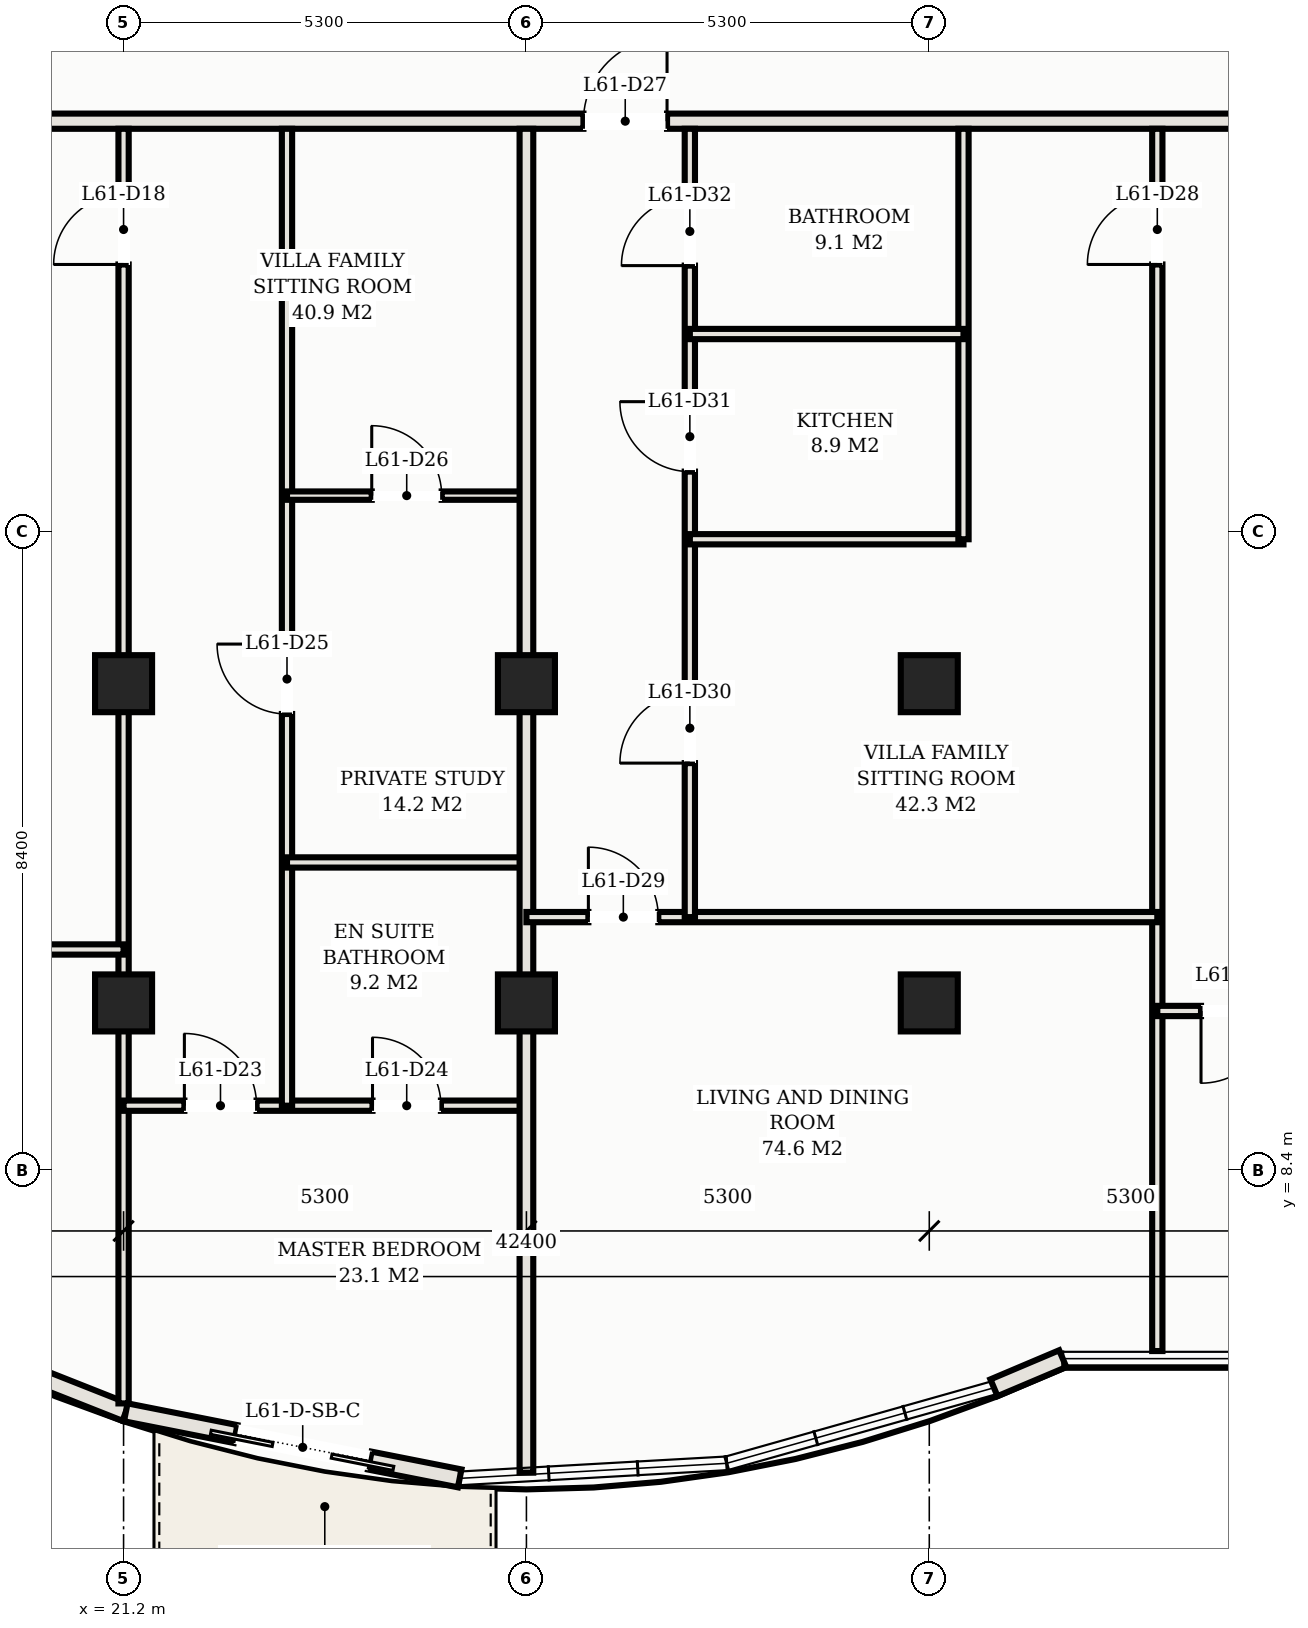
"""IFC4 building model, lengths in metres.
Left out: names, types, materials, properties, quantities, classifications, styles, units other than length and angle.
Written with IfcOpenShell. Run it as: python <this file> out.ifc"""

import sys

from ifc_helpers import new_model, si_unit, direction, frame, frame_2d, origin, origin_2d, place, context, subcontext, project, spatial, rectangle, hollow_rectangle, extrude, element, fill, save


model = new_model("IFC4")
c1 = context("Model", 3, precision=1e-05, world=origin(), true_north=direction((0.0, 1.0)))
c2 = subcontext(c1, "Body", "Model", "MODEL_VIEW")
j1 = project(units=[si_unit("LENGTHUNIT", "METRE"), si_unit("PLANEANGLEUNIT", "RADIAN")], contexts=[c1])
p1 = place(None, origin())
s1 = spatial("IfcSite", under=j1, at=p1, CompositionType="ELEMENT")
p2 = place(p1, origin())
s2 = spatial("IfcBuilding", under=s1, at=p2, CompositionType="ELEMENT")
p3 = place(p2, frame((0.0, 0.0, 223.1)))
s3 = spatial("IfcBuildingStorey", under=s2, at=p3, CompositionType="ELEMENT", Elevation=223.1)
for number, where, z_axis, x_axis in (
    (1, (21.2, 14.8, 0.0), (0.0, 0.0, 1.0), (1.0, 0.0, 0.0)),
    (2, (21.2, 10.6, 0.0), (0.0, 0.0, 1.0), (1.0, 0.0, 0.0)),
    (3, (26.5, 14.8, 0.0), (0.0, 0.0, 1.0), (1.0, 0.0, 0.0)),
    (4, (26.5, 10.6, 0.0), (0.0, 0.0, 1.0), (1.0, 0.0, 0.0)),
    (5, (31.8, 14.8, 0.0), (0.0, 0.0, 1.0), (1.0, 0.0, 0.0)),
    (6, (31.8, 10.6, 0.0), (0.0, 0.0, 1.0), (1.0, 0.0, 0.0)),
):
    element("IfcColumn", number, at=place(p3, frame(where, z_axis=z_axis, x_axis=x_axis)), inside=s3, PredefinedType="COLUMN", context=c2, shape_type="SweptSolid", body=[
        extrude(hollow_rectangle(XDim=0.75, YDim=0.75, WallThickness=0.025, at=origin_2d()), origin(), (0.0, 0.0, 1.0), 3.3),
    ])
p4 = place(p3, frame((19.444, 5.92, 0.0), z_axis=(0.0, 0.0, 1.0), x_axis=(0.92993442177, -0.367725401906, 0.0)))
e7 = element("IfcWall", 7, at=p4, inside=s3, PredefinedType="SOLIDWALL", context=c2, shape_type="SweptSolid", body=[
    extrude(rectangle(XDim=1.919, YDim=0.24, at=frame_2d((0.96, 0.0))), origin(), (0.0, 0.0, 1.0), 3.11),
])
p5 = place(p3, frame((21.229, 5.214, 0.0), z_axis=(0.0, 0.0, 1.0), x_axis=(0.980985349685, -0.194081796425, 0.0)))
e8 = element("IfcWall", 8, at=p5, inside=s3, PredefinedType="SOLIDWALL", context=c2, shape_type="SweptSolid", body=[
    extrude(rectangle(XDim=4.478, YDim=0.24, at=frame_2d((2.239, 0.0))), origin(), (0.0, 0.0, 1.0), 3.11),
])
p6 = place(p5, frame((1.473, 0.0, 0.0)))
e9 = element("IfcOpeningElement", 9, at=p6, cuts=e8, PredefinedType="OPENING", context=c2, shape_type="SweptSolid", body=[
    extrude(rectangle(XDim=1.8, YDim=2.2, at=frame_2d((0.9, 1.1))), frame((0.0, 0.13, 0.0), z_axis=(0.0, -1.0, 0.0), x_axis=(1.0, 0.0, 0.0)), (0.0, 0.0, 1.0), 0.26),
])
p7 = place(p3, frame((32.651, 5.537, 0.0), z_axis=(0.0, 0.0, 1.0), x_axis=(0.920998109395, 0.389567044924, 0.0)))
e10 = element("IfcWall", 10, at=p7, inside=s3, PredefinedType="SOLIDWALL", context=c2, shape_type="SweptSolid", body=[
    extrude(rectangle(XDim=0.983, YDim=0.24, at=frame_2d((0.491, 0.0))), origin(), (0.0, 0.0, 1.0), 3.11),
])
p8 = place(p3, frame((6.72, 22.2, 0.0), z_axis=(0.0, 0.0, 1.0), x_axis=(1.0, 0.0, 0.0)))
e11 = element("IfcWall", 11, at=p8, inside=s3, PredefinedType="PARTITIONING", context=c2, shape_type="SweptSolid", body=[
    extrude(rectangle(XDim=39.56, YDim=0.2, at=frame_2d((19.78, 0.0))), origin(), (0.0, 0.0, 1.0), 2.43),
])
p9 = place(p8, frame((4.63, 0.0, 0.0)))
e12 = element("IfcOpeningElement", 12, at=p9, cuts=e11, PredefinedType="OPENING", context=c2, shape_type="SweptSolid", body=[
    extrude(rectangle(XDim=1.1, YDim=2.25, at=frame_2d((0.55, 1.125))), frame((0.0, 0.11, 0.0), z_axis=(0.0, -1.0, 0.0), x_axis=(1.0, 0.0, 0.0)), (0.0, 0.0, 1.0), 0.22),
])
p10 = place(p8, frame((20.53, 0.0, 0.0)))
e13 = element("IfcOpeningElement", 13, at=p10, cuts=e11, PredefinedType="OPENING", context=c2, shape_type="SweptSolid", body=[
    extrude(rectangle(XDim=1.1, YDim=2.25, at=frame_2d((0.55, 1.125))), frame((0.0, 0.11, 0.0), z_axis=(0.0, -1.0, 0.0), x_axis=(1.0, 0.0, 0.0)), (0.0, 0.0, 1.0), 0.22),
])
p11 = place(p8, frame((1.435, 0.0, 0.0)))
e14 = element("IfcOpeningElement", 14, at=p11, cuts=e11, PredefinedType="OPENING", context=c2, shape_type="SweptSolid", body=[
    extrude(rectangle(XDim=0.92, YDim=2.15, at=frame_2d((0.46, 1.075))), frame((0.0, 0.11, 0.0), z_axis=(0.0, -1.0, 0.0), x_axis=(1.0, 0.0, 0.0)), (0.0, 0.0, 1.0), 0.22),
])
p12 = place(p8, frame((37.205, 0.0, 0.0)))
e15 = element("IfcOpeningElement", 15, at=p12, cuts=e11, PredefinedType="OPENING", context=c2, shape_type="SweptSolid", body=[
    extrude(rectangle(XDim=0.92, YDim=2.15, at=frame_2d((0.46, 1.075))), frame((0.0, 0.11, 0.0), z_axis=(0.0, -1.0, 0.0), x_axis=(1.0, 0.0, 0.0)), (0.0, 0.0, 1.0), 0.22),
])
p13 = place(p3, frame((21.2, 5.331, 0.0), z_axis=(0.0, 0.0, 1.0), x_axis=(0.0, 1.0, 0.0)))
e16 = element("IfcWall", 16, at=p13, inside=s3, PredefinedType="PARTITIONING", context=c2, shape_type="SweptSolid", body=[
    extrude(rectangle(XDim=16.769, YDim=0.135, at=frame_2d((8.385, 0.0))), origin(), (0.0, 0.0, 1.0), 2.43),
])
p14 = place(p13, frame((14.984, 0.0, 0.0)))
e17 = element("IfcOpeningElement", 17, at=p14, cuts=e16, PredefinedType="OPENING", context=c2, shape_type="SweptSolid", body=[
    extrude(rectangle(XDim=0.92, YDim=2.15, at=frame_2d((0.46, 1.075))), frame((0.0, 0.078, 0.0), z_axis=(0.0, -1.0, 0.0), x_axis=(1.0, 0.0, 0.0)), (0.0, 0.0, 1.0), 0.155),
])
p15 = place(p3, frame((10.6, 11.303, 0.0), z_axis=(0.0, 0.0, 1.0), x_axis=(1.0, 0.0, 0.0)))
e18 = element("IfcWall", 18, at=p15, inside=s3, PredefinedType="PARTITIONING", context=c2, shape_type="SweptSolid", body=[
    extrude(rectangle(XDim=10.6, YDim=0.135, at=frame_2d((5.3, 0.0))), origin(), (0.0, 0.0, 1.0), 2.43),
])
p16 = place(p15, frame((0.815, 0.0, 0.0)))
e19 = element("IfcOpeningElement", 19, at=p16, cuts=e18, PredefinedType="OPENING", context=c2, shape_type="SweptSolid", body=[
    extrude(rectangle(XDim=0.92, YDim=2.15, at=frame_2d((0.46, 1.075))), frame((0.0, 0.078, 0.0), z_axis=(0.0, -1.0, 0.0), x_axis=(1.0, 0.0, 0.0)), (0.0, 0.0, 1.0), 0.155),
])
p17 = place(p3, frame((21.2, 9.248, 0.0), z_axis=(0.0, 0.0, 1.0), x_axis=(1.0, 0.0, 0.0)))
e20 = element("IfcWall", 20, at=p17, inside=s3, PredefinedType="PARTITIONING", context=c2, shape_type="SweptSolid", body=[
    extrude(rectangle(XDim=5.3, YDim=0.135, at=frame_2d((2.65, 0.0))), origin(), (0.0, 0.0, 1.0), 2.43),
])
p18 = place(p17, frame((0.8, 0.0, 0.0)))
e21 = element("IfcOpeningElement", 21, at=p18, cuts=e20, PredefinedType="OPENING", context=c2, shape_type="SweptSolid", body=[
    extrude(rectangle(XDim=0.95, YDim=2.15, at=frame_2d((0.475, 1.075))), frame((0.0, 0.078, 0.0), z_axis=(0.0, -1.0, 0.0), x_axis=(1.0, 0.0, 0.0)), (0.0, 0.0, 1.0), 0.155),
])
p19 = place(p17, frame((3.275, 0.0, 0.0)))
e22 = element("IfcOpeningElement", 22, at=p19, cuts=e20, PredefinedType="OPENING", context=c2, shape_type="SweptSolid", body=[
    extrude(rectangle(XDim=0.9, YDim=2.15, at=frame_2d((0.45, 1.075))), frame((0.0, 0.078, 0.0), z_axis=(0.0, -1.0, 0.0), x_axis=(1.0, 0.0, 0.0)), (0.0, 0.0, 1.0), 0.155),
])
p20 = place(p3, frame((23.35, 9.248, 0.0), z_axis=(0.0, 0.0, 1.0), x_axis=(0.0, 1.0, 0.0)))
e23 = element("IfcWall", 23, at=p20, inside=s3, PredefinedType="PARTITIONING", context=c2, shape_type="SweptSolid", body=[
    extrude(rectangle(XDim=12.852, YDim=0.135, at=frame_2d((6.426, 0.0))), origin(), (0.0, 0.0, 1.0), 2.43),
])
p21 = place(p20, frame((5.153, 0.0, 0.0)))
e24 = element("IfcOpeningElement", 24, at=p21, cuts=e23, PredefinedType="OPENING", context=c2, shape_type="SweptSolid", body=[
    extrude(rectangle(XDim=0.92, YDim=2.15, at=frame_2d((0.46, 1.075))), frame((0.0, 0.078, 0.0), z_axis=(0.0, -1.0, 0.0), x_axis=(1.0, 0.0, 0.0)), (0.0, 0.0, 1.0), 0.155),
])
p22 = place(p3, frame((23.35, 12.448, 0.0), z_axis=(0.0, 0.0, 1.0), x_axis=(1.0, 0.0, 0.0)))
e25 = element("IfcWall", 25, at=p22, inside=s3, PredefinedType="PARTITIONING", context=c2, shape_type="SweptSolid", body=[
    extrude(rectangle(XDim=3.15, YDim=0.135, at=frame_2d((1.575, 0.0))), origin(), (0.0, 0.0, 1.0), 2.43),
])
p23 = place(p3, frame((23.35, 17.274, 0.0), z_axis=(0.0, 0.0, 1.0), x_axis=(1.0, 0.0, 0.0)))
e26 = element("IfcWall", 26, at=p23, inside=s3, PredefinedType="MOVABLE", context=c2, shape_type="SweptSolid", body=[
    extrude(rectangle(XDim=3.15, YDim=0.11, at=frame_2d((1.575, 0.0))), origin(), (0.0, 0.0, 1.0), 2.43),
])
p24 = place(p23, frame((1.115, 0.0, 0.0)))
e27 = element("IfcOpeningElement", 27, at=p24, cuts=e26, PredefinedType="OPENING", context=c2, shape_type="SweptSolid", body=[
    extrude(rectangle(XDim=0.92, YDim=2.15, at=frame_2d((0.46, 1.075))), frame((0.0, 0.065, 0.0), z_axis=(0.0, -1.0, 0.0), x_axis=(1.0, 0.0, 0.0)), (0.0, 0.0, 1.0), 0.13),
])
p25 = place(p3, frame((26.5, 4.42, 0.0), z_axis=(0.0, 0.0, 1.0), x_axis=(0.0, 1.0, 0.0)))
e28 = element("IfcWall", 28, at=p25, inside=s3, PredefinedType="PARTITIONING", context=c2, shape_type="SweptSolid", body=[
    extrude(rectangle(XDim=17.68, YDim=0.18, at=frame_2d((8.84, 0.0))), origin(), (0.0, 0.0, 1.0), 2.43),
])
p26 = place(p3, frame((34.8, 6.02, 0.0), z_axis=(0.0, 0.0, 1.0), x_axis=(0.0, 1.0, 0.0)))
e29 = element("IfcWall", 29, at=p26, inside=s3, PredefinedType="PARTITIONING", context=c2, shape_type="SweptSolid", body=[
    extrude(rectangle(XDim=16.08, YDim=0.135, at=frame_2d((8.04, 0.0))), origin(), (0.0, 0.0, 1.0), 2.43),
])
p27 = place(p26, frame((14.295, 0.0, 0.0)))
e30 = element("IfcOpeningElement", 30, at=p27, cuts=e29, PredefinedType="OPENING", context=c2, shape_type="SweptSolid", body=[
    extrude(rectangle(XDim=0.92, YDim=2.15, at=frame_2d((0.46, 1.075))), frame((0.0, 0.078, 0.0), z_axis=(0.0, -1.0, 0.0), x_axis=(1.0, 0.0, 0.0)), (0.0, 0.0, 1.0), 0.155),
])
p28 = place(p3, frame((26.5, 11.729, 0.0), z_axis=(0.0, 0.0, 1.0), x_axis=(1.0, 0.0, 0.0)))
e31 = element("IfcWall", 31, at=p28, inside=s3, PredefinedType="PARTITIONING", context=c2, shape_type="SweptSolid", body=[
    extrude(rectangle(XDim=8.3, YDim=0.135, at=frame_2d((4.15, 0.0))), origin(), (0.0, 0.0, 1.0), 2.43),
])
p29 = place(p28, frame((0.815, 0.0, 0.0)))
e32 = element("IfcOpeningElement", 32, at=p29, cuts=e31, PredefinedType="OPENING", context=c2, shape_type="SweptSolid", body=[
    extrude(rectangle(XDim=0.92, YDim=2.15, at=frame_2d((0.46, 1.075))), frame((0.0, 0.078, 0.0), z_axis=(0.0, -1.0, 0.0), x_axis=(1.0, 0.0, 0.0)), (0.0, 0.0, 1.0), 0.155),
])
p30 = place(p3, frame((28.65, 11.729, 0.0), z_axis=(0.0, 0.0, 1.0), x_axis=(0.0, 1.0, 0.0)))
e33 = element("IfcWall", 33, at=p30, inside=s3, PredefinedType="PARTITIONING", context=c2, shape_type="SweptSolid", body=[
    extrude(rectangle(XDim=10.371, YDim=0.135, at=frame_2d((5.186, 0.0))), origin(), (0.0, 0.0, 1.0), 2.43),
])
p31 = place(p30, frame((2.026, 0.0, 0.0)))
e34 = element("IfcOpeningElement", 34, at=p31, cuts=e33, PredefinedType="OPENING", context=c2, shape_type="SweptSolid", body=[
    extrude(rectangle(XDim=0.92, YDim=2.15, at=frame_2d((0.46, 1.075))), frame((0.0, 0.078, 0.0), z_axis=(0.0, -1.0, 0.0), x_axis=(1.0, 0.0, 0.0)), (0.0, 0.0, 1.0), 0.155),
])
p32 = place(p30, frame((5.861, 0.0, 0.0)))
e35 = element("IfcOpeningElement", 35, at=p32, cuts=e33, PredefinedType="OPENING", context=c2, shape_type="SweptSolid", body=[
    extrude(rectangle(XDim=0.92, YDim=2.15, at=frame_2d((0.46, 1.075))), frame((0.0, 0.078, 0.0), z_axis=(0.0, -1.0, 0.0), x_axis=(1.0, 0.0, 0.0)), (0.0, 0.0, 1.0), 0.155),
])
p33 = place(p30, frame((8.571, 0.0, 0.0)))
e36 = element("IfcOpeningElement", 36, at=p33, cuts=e33, PredefinedType="OPENING", context=c2, shape_type="SweptSolid", body=[
    extrude(rectangle(XDim=0.9, YDim=2.15, at=frame_2d((0.45, 1.075))), frame((0.0, 0.078, 0.0), z_axis=(0.0, -1.0, 0.0), x_axis=(1.0, 0.0, 0.0)), (0.0, 0.0, 1.0), 0.155),
])
p34 = place(p3, frame((28.65, 16.7, 0.0), z_axis=(0.0, 0.0, 1.0), x_axis=(1.0, 0.0, 0.0)))
e37 = element("IfcWall", 37, at=p34, inside=s3, PredefinedType="PARTITIONING", context=c2, shape_type="SweptSolid", body=[
    extrude(rectangle(XDim=3.6, YDim=0.135, at=frame_2d((1.8, 0.0))), origin(), (0.0, 0.0, 1.0), 2.43),
])
p35 = place(p3, frame((32.25, 16.7, 0.0), z_axis=(0.0, 0.0, 1.0), x_axis=(0.0, 1.0, 0.0)))
e38 = element("IfcWall", 38, at=p35, inside=s3, PredefinedType="PARTITIONING", context=c2, shape_type="SweptSolid", body=[
    extrude(rectangle(XDim=5.4, YDim=0.135, at=frame_2d((2.7, 0.0))), origin(), (0.0, 0.0, 1.0), 2.43),
])
p36 = place(p3, frame((28.65, 19.4, 0.0), z_axis=(0.0, 0.0, 1.0), x_axis=(1.0, 0.0, 0.0)))
e39 = element("IfcWall", 39, at=p36, inside=s3, PredefinedType="PARTITIONING", context=c2, shape_type="SweptSolid", body=[
    extrude(rectangle(XDim=3.6, YDim=0.135, at=frame_2d((1.8, 0.0))), origin(), (0.0, 0.0, 1.0), 2.43),
])
p37 = place(p3, frame((34.8, 10.494, 0.0), z_axis=(0.0, 0.0, 1.0), x_axis=(1.0, 0.0, 0.0)))
e40 = element("IfcWall", 40, at=p37, inside=s3, PredefinedType="PARTITIONING", context=c2, shape_type="SweptSolid", body=[
    extrude(rectangle(XDim=7.6, YDim=0.135, at=frame_2d((3.8, 0.0))), origin(), (0.0, 0.0, 1.0), 2.43),
])
p38 = place(p37, frame((0.575, 0.0, 0.0)))
e41 = element("IfcOpeningElement", 41, at=p38, cuts=e40, PredefinedType="OPENING", context=c2, shape_type="SweptSolid", body=[
    extrude(rectangle(XDim=0.95, YDim=2.15, at=frame_2d((0.475, 1.075))), frame((0.0, 0.078, 0.0), z_axis=(0.0, -1.0, 0.0), x_axis=(1.0, 0.0, 0.0)), (0.0, 0.0, 1.0), 0.155),
])
p39 = place(p37, frame((4.95, 0.0, 0.0)))
e42 = element("IfcOpeningElement", 42, at=p39, cuts=e40, PredefinedType="OPENING", context=c2, shape_type="SweptSolid", body=[
    extrude(rectangle(XDim=0.9, YDim=2.15, at=frame_2d((0.45, 1.075))), frame((0.0, 0.078, 0.0), z_axis=(0.0, -1.0, 0.0), x_axis=(1.0, 0.0, 0.0)), (0.0, 0.0, 1.0), 0.155),
])
p40 = place(p6, frame((1.8, 0.0, 0.0), z_axis=(0.0, 0.0, 1.0), x_axis=(-1.0, 0.0, 0.0)))
e43 = element("IfcDoor", 43, at=p40, inside=s3, OperationType="DOUBLE_DOOR_SLIDING", PredefinedType="DOOR", context=c2, shape_type="SweptSolid", body=[
    extrude(rectangle(XDim=1.8, YDim=2.2, at=frame_2d((0.9, 1.1))), frame((0.0, 0.025, 0.0), z_axis=(0.0, -1.0, 0.0), x_axis=(1.0, 0.0, 0.0)), (0.0, 0.0, 1.0), 0.05),
])
fill(e9, e43)
p41 = place(p14, origin())
e44 = element("IfcDoor", 44, at=p41, inside=s3, OperationType="SINGLE_SWING_LEFT", PredefinedType="DOOR", context=c2, shape_type="SweptSolid", body=[
    extrude(rectangle(XDim=0.92, YDim=2.15, at=frame_2d((0.46, 1.075))), frame((0.0, 0.025, 0.0), z_axis=(0.0, -1.0, 0.0), x_axis=(1.0, 0.0, 0.0)), (0.0, 0.0, 1.0), 0.05),
])
fill(e17, e44)
p42 = place(p18, origin())
e45 = element("IfcDoor", 45, at=p42, inside=s3, OperationType="SINGLE_SWING_LEFT", PredefinedType="DOOR", context=c2, shape_type="SweptSolid", body=[
    extrude(rectangle(XDim=0.95, YDim=2.15, at=frame_2d((0.475, 1.075))), frame((0.0, 0.025, 0.0), z_axis=(0.0, -1.0, 0.0), x_axis=(1.0, 0.0, 0.0)), (0.0, 0.0, 1.0), 0.05),
])
fill(e21, e45)
p43 = place(p19, origin())
e46 = element("IfcDoor", 46, at=p43, inside=s3, OperationType="SINGLE_SWING_LEFT", PredefinedType="DOOR", context=c2, shape_type="SweptSolid", body=[
    extrude(rectangle(XDim=0.9, YDim=2.15, at=frame_2d((0.45, 1.075))), frame((0.0, 0.025, 0.0), z_axis=(0.0, -1.0, 0.0), x_axis=(1.0, 0.0, 0.0)), (0.0, 0.0, 1.0), 0.05),
])
fill(e22, e46)
p44 = place(p21, origin())
e47 = element("IfcDoor", 47, at=p44, inside=s3, OperationType="SINGLE_SWING_RIGHT", PredefinedType="DOOR", context=c2, shape_type="SweptSolid", body=[
    extrude(rectangle(XDim=0.92, YDim=2.15, at=frame_2d((0.46, 1.075))), frame((0.0, 0.025, 0.0), z_axis=(0.0, -1.0, 0.0), x_axis=(1.0, 0.0, 0.0)), (0.0, 0.0, 1.0), 0.05),
])
fill(e24, e47)
p45 = place(p24, origin())
e48 = element("IfcDoor", 48, at=p45, inside=s3, OperationType="SINGLE_SWING_LEFT", PredefinedType="DOOR", context=c2, shape_type="SweptSolid", body=[
    extrude(rectangle(XDim=0.92, YDim=2.15, at=frame_2d((0.46, 1.075))), frame((0.0, 0.025, 0.0), z_axis=(0.0, -1.0, 0.0), x_axis=(1.0, 0.0, 0.0)), (0.0, 0.0, 1.0), 0.05),
])
fill(e27, e48)
p46 = place(p10, origin())
e49 = element("IfcDoor", 49, at=p46, inside=s3, OperationType="SINGLE_SWING_RIGHT", PredefinedType="DOOR", context=c2, shape_type="SweptSolid", body=[
    extrude(rectangle(XDim=1.1, YDim=2.25, at=frame_2d((0.55, 1.125))), frame((0.0, 0.025, 0.0), z_axis=(0.0, -1.0, 0.0), x_axis=(1.0, 0.0, 0.0)), (0.0, 0.0, 1.0), 0.05),
])
fill(e13, e49)
p47 = place(p27, origin())
e50 = element("IfcDoor", 50, at=p47, inside=s3, OperationType="SINGLE_SWING_LEFT", PredefinedType="DOOR", context=c2, shape_type="SweptSolid", body=[
    extrude(rectangle(XDim=0.92, YDim=2.15, at=frame_2d((0.46, 1.075))), frame((0.0, 0.025, 0.0), z_axis=(0.0, -1.0, 0.0), x_axis=(1.0, 0.0, 0.0)), (0.0, 0.0, 1.0), 0.05),
])
fill(e30, e50)
p48 = place(p29, origin())
e51 = element("IfcDoor", 51, at=p48, inside=s3, OperationType="SINGLE_SWING_LEFT", PredefinedType="DOOR", context=c2, shape_type="SweptSolid", body=[
    extrude(rectangle(XDim=0.92, YDim=2.15, at=frame_2d((0.46, 1.075))), frame((0.0, 0.025, 0.0), z_axis=(0.0, -1.0, 0.0), x_axis=(1.0, 0.0, 0.0)), (0.0, 0.0, 1.0), 0.05),
])
fill(e32, e51)
p49 = place(p31, origin())
e52 = element("IfcDoor", 52, at=p49, inside=s3, OperationType="SINGLE_SWING_LEFT", PredefinedType="DOOR", context=c2, shape_type="SweptSolid", body=[
    extrude(rectangle(XDim=0.92, YDim=2.15, at=frame_2d((0.46, 1.075))), frame((0.0, 0.025, 0.0), z_axis=(0.0, -1.0, 0.0), x_axis=(1.0, 0.0, 0.0)), (0.0, 0.0, 1.0), 0.05),
])
fill(e34, e52)
p50 = place(p32, origin())
e53 = element("IfcDoor", 53, at=p50, inside=s3, OperationType="SINGLE_SWING_RIGHT", PredefinedType="DOOR", context=c2, shape_type="SweptSolid", body=[
    extrude(rectangle(XDim=0.92, YDim=2.15, at=frame_2d((0.46, 1.075))), frame((0.0, 0.025, 0.0), z_axis=(0.0, -1.0, 0.0), x_axis=(1.0, 0.0, 0.0)), (0.0, 0.0, 1.0), 0.05),
])
fill(e35, e53)
p51 = place(p33, origin())
e54 = element("IfcDoor", 54, at=p51, inside=s3, OperationType="SINGLE_SWING_LEFT", PredefinedType="DOOR", context=c2, shape_type="SweptSolid", body=[
    extrude(rectangle(XDim=0.9, YDim=2.15, at=frame_2d((0.45, 1.075))), frame((0.0, 0.025, 0.0), z_axis=(0.0, -1.0, 0.0), x_axis=(1.0, 0.0, 0.0)), (0.0, 0.0, 1.0), 0.05),
])
fill(e36, e54)
p52 = place(p38, frame((0.95, 0.0, 0.0), z_axis=(0.0, 0.0, 1.0), x_axis=(-1.0, 0.0, 0.0)))
e55 = element("IfcDoor", 55, at=p52, inside=s3, OperationType="SINGLE_SWING_RIGHT", PredefinedType="DOOR", context=c2, shape_type="SweptSolid", body=[
    extrude(rectangle(XDim=0.95, YDim=2.15, at=frame_2d((0.475, 1.075))), frame((0.0, 0.025, 0.0), z_axis=(0.0, -1.0, 0.0), x_axis=(1.0, 0.0, 0.0)), (0.0, 0.0, 1.0), 0.05),
])
fill(e41, e55)
save(model, sys.argv[1])
